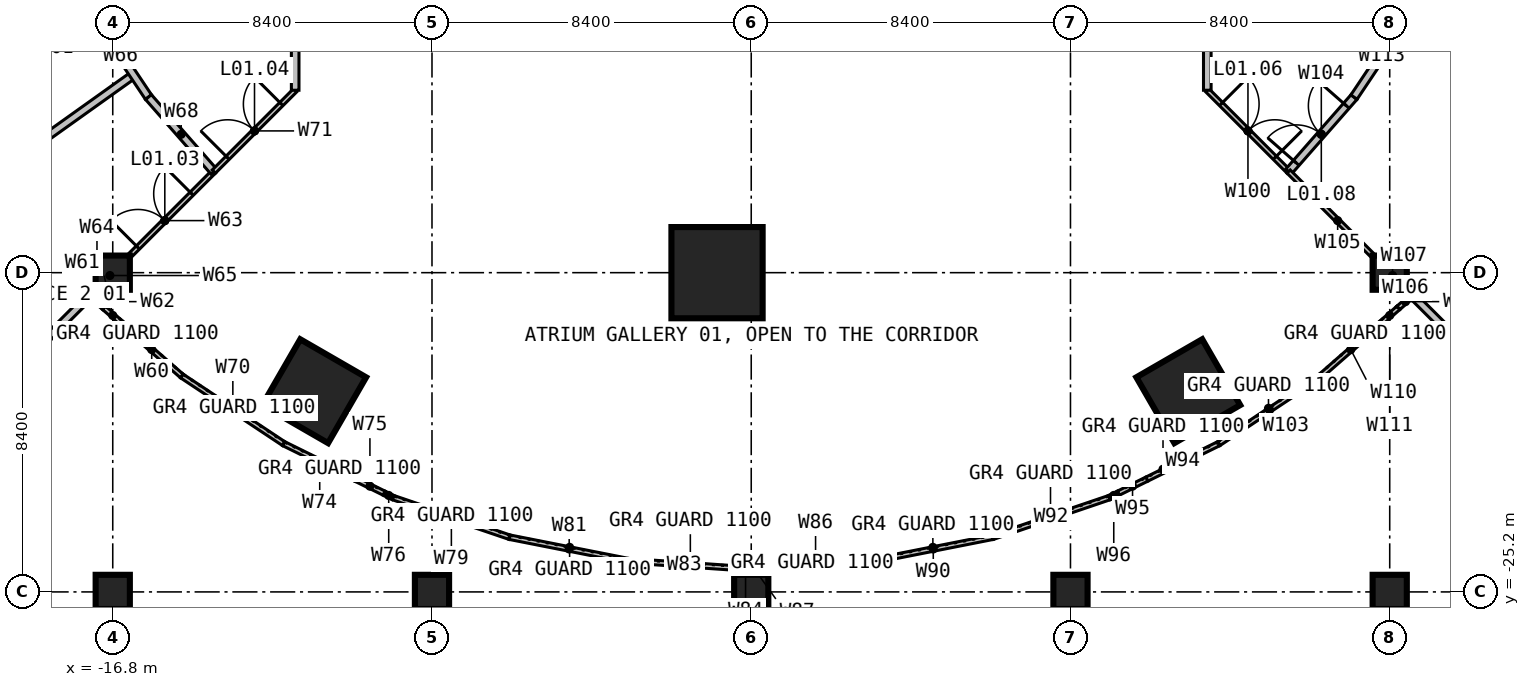
"""IFC4 building model, lengths in metres.
Left out: names, types, materials, properties, quantities, classifications, styles, units other than length and angle.
Written with IfcOpenShell. Run it as: python <this file> out.ifc"""

import sys

from ifc_helpers import new_model, si_unit, direction, frame, frame_2d, origin, origin_2d, place, context, subcontext, project, spatial, rectangle, hollow_rectangle, extrude, element, fill, save


model = new_model("IFC4")
c1 = context("Model", 3, precision=1e-05, world=origin(), true_north=direction((0.0, 1.0)))
c2 = subcontext(c1, "Body", "Model", "MODEL_VIEW")
j1 = project(units=[si_unit("LENGTHUNIT", "METRE"), si_unit("PLANEANGLEUNIT", "RADIAN")], contexts=[c1])
p1 = place(None, origin())
s1 = spatial("IfcSite", under=j1, at=p1, CompositionType="ELEMENT")
p2 = place(p1, origin())
s2 = spatial("IfcBuilding", under=s1, at=p2, CompositionType="ELEMENT")
p3 = place(p2, frame((0.0, 0.0, 6.0)))
s3 = spatial("IfcBuildingStorey", under=s2, at=p3, CompositionType="ELEMENT", Elevation=6.0)
for number, where, z_axis, x_axis in (
    (1, (-16.8, -25.2, 0.0), (0.0, 0.0, 1.0), (1.0, 0.0, 0.0)),
    (2, (-16.8, -16.8, 0.0), (0.0, 0.0, 1.0), (1.0, 0.0, 0.0)),
    (3, (-8.4, -25.2, 0.0), (0.0, 0.0, 1.0), (1.0, 0.0, 0.0)),
    (4, (0.0, -25.2, 0.0), (0.0, 0.0, 1.0), (1.0, 0.0, 0.0)),
):
    element("IfcColumn", number, at=place(p3, frame(where, z_axis=z_axis, x_axis=x_axis)), inside=s3, PredefinedType="COLUMN", context=c2, shape_type="SweptSolid", body=[
        extrude(rectangle(XDim=0.9, YDim=0.9, at=origin_2d()), origin(), (0.0, 0.0, 1.0), 5.0),
    ])
p4 = place(p3, frame((-0.9, -16.8, 0.0), z_axis=(0.0, 0.0, 1.0), x_axis=(1.0, 0.0, 0.0)))
e5 = element("IfcColumn", 5, at=p4, inside=s3, PredefinedType="COLUMN", context=c2, shape_type="SweptSolid", body=[
    extrude(rectangle(XDim=2.4, YDim=2.4, at=origin_2d()), origin(), (0.0, 0.0, 1.0), 5.0),
])
for number, where, z_axis, x_axis in (
    (6, (8.4, -25.2, 0.0), (0.0, 0.0, 1.0), (1.0, 0.0, 0.0)),
    (7, (16.8, -25.2, 0.0), (0.0, 0.0, 1.0), (1.0, 0.0, 0.0)),
    (8, (16.8, -16.8, 0.0), (0.0, 0.0, 1.0), (1.0, 0.0, 0.0)),
):
    element("IfcColumn", number, at=place(p3, frame(where, z_axis=z_axis, x_axis=x_axis)), inside=s3, PredefinedType="COLUMN", context=c2, shape_type="SweptSolid", body=[
        extrude(rectangle(XDim=0.9, YDim=0.9, at=origin_2d()), origin(), (0.0, 0.0, 1.0), 5.0),
    ])
for number, where, z_axis, x_axis in (
    (9, (-11.5, -19.919, 0.0), (0.0, 0.0, 1.0), (-0.5, -0.866, 0.0)),
    (10, (11.5, -19.919, 0.0), (0.0, 0.0, 1.0), (0.5, -0.866, 0.0)),
):
    element("IfcColumn", number, at=place(p3, frame(where, z_axis=z_axis, x_axis=x_axis)), inside=s3, PredefinedType="COLUMN", context=c2, shape_type="SweptSolid", body=[
        extrude(hollow_rectangle(XDim=2.0, YDim=2.0, WallThickness=0.24, at=origin_2d()), origin(), (0.0, 0.0, 1.0), 5.0),
    ])
p5 = place(p3, frame((-28.94, -20.64, 0.0), z_axis=(0.0, 0.0, 1.0), x_axis=(0.814258557322, 0.580502370217, 0.0)))
e11 = element("IfcWall", 11, at=p5, inside=s3, PredefinedType="PARTITIONING", context=c2, shape_type="SweptSolid", body=[
    extrude(rectangle(XDim=15.572, YDim=0.2, at=frame_2d((7.786, 0.0))), origin(), (0.0, 0.0, 1.0), 4.7),
])
p6 = place(p3, frame((-24.486, -24.486, 0.0), z_axis=(0.0, 0.0, 1.0), x_axis=(0.707106781187, 0.707106781187, 0.0)))
e12 = element("IfcWall", 12, at=p6, inside=s3, PredefinedType="PARTITIONING", context=c2, shape_type="SweptSolid", body=[
    extrude(rectangle(XDim=10.022, YDim=0.2, at=frame_2d((5.011, 0.0))), origin(), (0.0, 0.0, 1.0), 4.7),
])
p7 = place(p3, frame((-16.57, -18.127, 0.0), z_axis=(0.0, 0.0, 1.0), x_axis=(0.752226011438, -0.658905173538, 0.0)))
e13 = element("IfcWall", 13, at=p7, inside=s3, PredefinedType="PARTITIONING", context=c2, shape_type="SweptSolid", body=[
    extrude(rectangle(XDim=2.114, YDim=0.12, at=frame_2d((1.057, 0.0))), origin(), (0.0, 0.0, 1.0), 4.7),
])
p8 = place(p3, frame((-17.03, -17.724, 0.0), z_axis=(0.0, 0.0, 1.0), x_axis=(0.752081905539, -0.65906965289, 0.0)))
e14 = element("IfcWall", 14, at=p8, inside=s3, PredefinedType="PARTITIONING", context=c2, shape_type="SweptSolid", body=[
    extrude(rectangle(XDim=0.612, YDim=0.12, at=frame_2d((0.306, 0.0))), origin(), (0.0, 0.0, 1.0), 4.3),
])
p9 = place(p3, frame((-17.4, -17.4, 0.0), z_axis=(0.0, 0.0, 1.0), x_axis=(0.751992181934, -0.659172024824, 0.0)))
e15 = element("IfcWall", 15, at=p9, inside=s3, PredefinedType="PARTITIONING", context=c2, shape_type="SweptSolid", body=[
    extrude(rectangle(XDim=0.492, YDim=0.12, at=frame_2d((0.246, 0.0))), origin(), (0.0, 0.0, 1.0), 4.7),
])
p10 = place(p3, frame((-16.72, -16.72, 0.0), z_axis=(0.0, 0.0, 1.0), x_axis=(0.707106781187, 0.707106781187, 0.0)))
e16 = element("IfcWall", 16, at=p10, inside=s3, PredefinedType="PARTITIONING", context=c2, shape_type="SweptSolid", body=[
    extrude(rectangle(XDim=3.649, YDim=0.12, at=frame_2d((1.824, 0.0))), origin(), (0.0, 0.0, 1.0), 4.7),
])
p11 = place(p10, frame((0.824, 0.0, 0.0)))
e17 = element("IfcOpeningElement", 17, at=p11, cuts=e16, PredefinedType="OPENING", context=c2, shape_type="SweptSolid", body=[
    extrude(rectangle(XDim=2.0, YDim=2.4, at=frame_2d((1.0, 1.2))), frame((0.0, 0.07, 0.0), z_axis=(0.0, -1.0, 0.0), x_axis=(1.0, 0.0, 0.0)), (0.0, 0.0, 1.0), 0.14),
])
p12 = place(p3, frame((-17.4, -17.4, 0.0), z_axis=(0.0, 0.0, 1.0), x_axis=(0.707106781187, 0.707106781187, 0.0)))
e18 = element("IfcWall", 18, at=p12, inside=s3, PredefinedType="PARTITIONING", context=c2, shape_type="SweptSolid", body=[
    extrude(rectangle(XDim=0.523, YDim=0.12, at=frame_2d((0.262, 0.0))), origin(), (0.0, 0.0, 1.0), 4.7),
])
p13 = place(p3, frame((-17.03, -17.03, 0.0), z_axis=(0.0, 0.0, 1.0), x_axis=(0.707106781187, 0.707106781187, 0.0)))
e19 = element("IfcWall", 19, at=p13, inside=s3, PredefinedType="PARTITIONING", context=c2, shape_type="SweptSolid", body=[
    extrude(rectangle(XDim=0.438, YDim=0.12, at=frame_2d((0.219, 0.0))), origin(), (0.0, 0.0, 1.0), 4.3),
])
p14 = place(p3, frame((-17.32, -10.0, 0.0), z_axis=(0.0, 0.0, 1.0), x_axis=(0.556459812229, -0.83087452565, 0.0)))
e20 = element("IfcWall", 20, at=p14, inside=s3, PredefinedType="PARTITIONING", context=c2, shape_type="SweptSolid", body=[
    extrude(rectangle(XDim=2.624, YDim=0.2, at=frame_2d((1.312, 0.0))), origin(), (0.0, 0.0, 1.0), 4.7),
])
p15 = place(p3, frame((-15.86, -12.18, 0.0), z_axis=(0.0, 0.0, 1.0), x_axis=(0.659643857667, -0.751578326618, 0.0)))
e21 = element("IfcWall", 21, at=p15, inside=s3, PredefinedType="PARTITIONING", context=c2, shape_type="SweptSolid", body=[
    extrude(rectangle(XDim=2.608, YDim=0.2, at=frame_2d((1.304, 0.0))), origin(), (0.0, 0.0, 1.0), 4.7),
])
p16 = place(p3, frame((-14.98, -19.52, 0.0), z_axis=(0.0, 0.0, 1.0), x_axis=(0.832994734858, -0.553280915719, 0.0)))
e22 = element("IfcWall", 22, at=p16, inside=s3, PredefinedType="PARTITIONING", context=c2, shape_type="SweptSolid", body=[
    extrude(rectangle(XDim=3.217, YDim=0.12, at=frame_2d((1.609, 0.0))), origin(), (0.0, 0.0, 1.0), 4.7),
])
p17 = place(p3, frame((-14.14, -14.14, 0.0), z_axis=(0.0, 0.0, 1.0), x_axis=(0.707106781187, 0.707106781187, 0.0)))
e23 = element("IfcWall", 23, at=p17, inside=s3, PredefinedType="PARTITIONING", context=c2, shape_type="SweptSolid", body=[
    extrude(rectangle(XDim=3.026, YDim=0.12, at=frame_2d((1.513, 0.0))), origin(), (0.0, 0.0, 1.0), 4.7),
])
p18 = place(p17, frame((0.513, 0.0, 0.0)))
e24 = element("IfcOpeningElement", 24, at=p18, cuts=e23, PredefinedType="OPENING", context=c2, shape_type="SweptSolid", body=[
    extrude(rectangle(XDim=2.0, YDim=2.4, at=frame_2d((1.0, 1.2))), frame((0.0, 0.07, 0.0), z_axis=(0.0, -1.0, 0.0), x_axis=(1.0, 0.0, 0.0)), (0.0, 0.0, 1.0), 0.14),
])
p19 = place(p3, frame((-12.3, -21.3, 0.0), z_axis=(0.0, 0.0, 1.0), x_axis=(0.896913641042, -0.442205744551, 0.0)))
e25 = element("IfcWall", 25, at=p19, inside=s3, PredefinedType="PARTITIONING", context=c2, shape_type="SweptSolid", body=[
    extrude(rectangle(XDim=2.109, YDim=0.12, at=frame_2d((1.055, 0.0))), origin(), (0.0, 0.0, 1.0), 4.7),
])
p20 = place(p3, frame((-10.408, -22.233, 0.0), z_axis=(0.0, 0.0, 1.0), x_axis=(0.896921584296, -0.442189633103, 0.0)))
e26 = element("IfcWall", 26, at=p20, inside=s3, PredefinedType="PARTITIONING", context=c2, shape_type="SweptSolid", body=[
    extrude(rectangle(XDim=0.837, YDim=0.12, at=frame_2d((0.418, 0.0))), origin(), (0.0, 0.0, 1.0), 4.3),
])
p21 = place(p3, frame((-9.658, -22.603, 0.0), z_axis=(0.0, 0.0, 1.0), x_axis=(0.896990941369, -0.442048923878, 0.0)))
e27 = element("IfcWall", 27, at=p21, inside=s3, PredefinedType="PARTITIONING", context=c2, shape_type="SweptSolid", body=[
    extrude(rectangle(XDim=0.265, YDim=0.12, at=frame_2d((0.133, 0.0))), origin(), (0.0, 0.0, 1.0), 4.7),
])
p22 = place(p3, frame((-9.42, -22.72, 0.0), z_axis=(0.0, 0.0, 1.0), x_axis=(0.946800830057, -0.321820117773, 0.0)))
e28 = element("IfcWall", 28, at=p22, inside=s3, PredefinedType="PARTITIONING", context=c2, shape_type="SweptSolid", body=[
    extrude(rectangle(XDim=3.232, YDim=0.12, at=frame_2d((1.616, 0.0))), origin(), (0.0, 0.0, 1.0), 4.7),
])
p23 = place(p3, frame((-6.36, -23.76, 0.0), z_axis=(0.0, 0.0, 1.0), x_axis=(0.98106754531, -0.193665876033, 0.0)))
e29 = element("IfcWall", 29, at=p23, inside=s3, PredefinedType="PARTITIONING", context=c2, shape_type="SweptSolid", body=[
    extrude(rectangle(XDim=3.201, YDim=0.12, at=frame_2d((1.6, 0.0))), origin(), (0.0, 0.0, 1.0), 4.7),
])
p24 = place(p3, frame((-3.22, -24.38, 0.0), z_axis=(0.0, 0.0, 1.0), x_axis=(0.997672751552, -0.068184168332, 0.0)))
e30 = element("IfcWall", 30, at=p24, inside=s3, PredefinedType="PARTITIONING", context=c2, shape_type="SweptSolid", body=[
    extrude(rectangle(XDim=2.929, YDim=0.12, at=frame_2d((1.464, 0.0))), origin(), (0.0, 0.0, 1.0), 4.7),
])
p25 = place(p3, frame((-0.298, -24.58, 0.0), z_axis=(0.0, 0.0, 1.0), x_axis=(0.997638063988, -0.068689833914, 0.0)))
e31 = element("IfcWall", 31, at=p25, inside=s3, PredefinedType="PARTITIONING", context=c2, shape_type="SweptSolid", body=[
    extrude(rectangle(XDim=0.299, YDim=0.12, at=frame_2d((0.149, 0.0))), origin(), (0.0, 0.0, 1.0), 4.3),
])
p26 = place(p3, frame((0.166, -24.589, 0.0), z_axis=(0.0, 0.0, 1.0), x_axis=(0.997672608774, 0.068186257434, 0.0)))
e32 = element("IfcWall", 32, at=p26, inside=s3, PredefinedType="PARTITIONING", context=c2, shape_type="SweptSolid", body=[
    extrude(rectangle(XDim=3.061, YDim=0.12, at=frame_2d((1.531, 0.0))), origin(), (0.0, 0.0, 1.0), 4.7),
])
p27 = place(p3, frame((0.0, -24.6, 0.0), z_axis=(0.0, 0.0, 1.0), x_axis=(0.997612909128, 0.069054207259, 0.0)))
e33 = element("IfcWall", 33, at=p27, inside=s3, PredefinedType="PARTITIONING", context=c2, shape_type="SweptSolid", body=[
    extrude(rectangle(XDim=0.166, YDim=0.12, at=frame_2d((0.083, 0.0))), origin(), (0.0, 0.0, 1.0), 4.3),
])
p28 = place(p3, frame((3.22, -24.38, 0.0), z_axis=(0.0, 0.0, 1.0), x_axis=(0.98106754531, 0.193665876033, 0.0)))
e34 = element("IfcWall", 34, at=p28, inside=s3, PredefinedType="PARTITIONING", context=c2, shape_type="SweptSolid", body=[
    extrude(rectangle(XDim=3.201, YDim=0.12, at=frame_2d((1.6, 0.0))), origin(), (0.0, 0.0, 1.0), 4.7),
])
p29 = place(p3, frame((6.36, -23.76, 0.0), z_axis=(0.0, 0.0, 1.0), x_axis=(0.946800830057, 0.321820117773, 0.0)))
e35 = element("IfcWall", 35, at=p29, inside=s3, PredefinedType="PARTITIONING", context=c2, shape_type="SweptSolid", body=[
    extrude(rectangle(XDim=3.232, YDim=0.12, at=frame_2d((1.616, 0.0))), origin(), (0.0, 0.0, 1.0), 4.7),
])
p30 = place(p3, frame((10.408, -22.233, 0.0), z_axis=(0.0, 0.0, 1.0), x_axis=(0.896913641042, 0.442205744551, 0.0)))
e36 = element("IfcWall", 36, at=p30, inside=s3, PredefinedType="PARTITIONING", context=c2, shape_type="SweptSolid", body=[
    extrude(rectangle(XDim=2.109, YDim=0.12, at=frame_2d((1.055, 0.0))), origin(), (0.0, 0.0, 1.0), 4.7),
])
p31 = place(p3, frame((9.658, -22.603, 0.0), z_axis=(0.0, 0.0, 1.0), x_axis=(0.896921584296, 0.442189633103, 0.0)))
e37 = element("IfcWall", 37, at=p31, inside=s3, PredefinedType="PARTITIONING", context=c2, shape_type="SweptSolid", body=[
    extrude(rectangle(XDim=0.837, YDim=0.12, at=frame_2d((0.418, 0.0))), origin(), (0.0, 0.0, 1.0), 4.3),
])
p32 = place(p3, frame((9.42, -22.72, 0.0), z_axis=(0.0, 0.0, 1.0), x_axis=(0.896990941369, 0.442048923878, 0.0)))
e38 = element("IfcWall", 38, at=p32, inside=s3, PredefinedType="PARTITIONING", context=c2, shape_type="SweptSolid", body=[
    extrude(rectangle(XDim=0.265, YDim=0.12, at=frame_2d((0.133, 0.0))), origin(), (0.0, 0.0, 1.0), 4.7),
])
p33 = place(p3, frame((12.0, -12.0, 0.0), z_axis=(0.0, 0.0, 1.0), x_axis=(0.707106781187, -0.707106781187, 0.0)))
e39 = element("IfcWall", 39, at=p33, inside=s3, PredefinedType="PARTITIONING", context=c2, shape_type="SweptSolid", body=[
    extrude(rectangle(XDim=3.026, YDim=0.12, at=frame_2d((1.513, 0.0))), origin(), (0.0, 0.0, 1.0), 4.7),
])
p34 = place(p33, frame((0.513, 0.0, 0.0)))
e40 = element("IfcOpeningElement", 40, at=p34, cuts=e39, PredefinedType="OPENING", context=c2, shape_type="SweptSolid", body=[
    extrude(rectangle(XDim=2.0, YDim=2.4, at=frame_2d((1.0, 1.2))), frame((0.0, 0.07, 0.0), z_axis=(0.0, -1.0, 0.0), x_axis=(1.0, 0.0, 0.0)), (0.0, 0.0, 1.0), 0.14),
])
p35 = place(p3, frame((12.3, -21.3, 0.0), z_axis=(0.0, 0.0, 1.0), x_axis=(0.832994734858, 0.553280915719, 0.0)))
e41 = element("IfcWall", 41, at=p35, inside=s3, PredefinedType="PARTITIONING", context=c2, shape_type="SweptSolid", body=[
    extrude(rectangle(XDim=3.217, YDim=0.12, at=frame_2d((1.609, 0.0))), origin(), (0.0, 0.0, 1.0), 4.7),
])
p36 = place(p3, frame((14.14, -14.14, 0.0), z_axis=(0.0, 0.0, 1.0), x_axis=(0.659643857667, 0.751578326618, 0.0)))
e42 = element("IfcWall", 42, at=p36, inside=s3, PredefinedType="PARTITIONING", context=c2, shape_type="SweptSolid", body=[
    extrude(rectangle(XDim=2.608, YDim=0.2, at=frame_2d((1.304, 0.0))), origin(), (0.0, 0.0, 1.0), 4.7),
])
p37 = place(p36, frame((0.304, 0.0, 0.0)))
e43 = element("IfcOpeningElement", 43, at=p37, cuts=e42, PredefinedType="OPENING", context=c2, shape_type="SweptSolid", body=[
    extrude(rectangle(XDim=2.0, YDim=2.4, at=frame_2d((1.0, 1.2))), frame((0.0, 0.11, 0.0), z_axis=(0.0, -1.0, 0.0), x_axis=(1.0, 0.0, 0.0)), (0.0, 0.0, 1.0), 0.22),
])
p38 = place(p3, frame((14.14, -14.14, 0.0), z_axis=(0.0, 0.0, 1.0), x_axis=(0.707106781187, -0.707106781187, 0.0)))
e44 = element("IfcWall", 44, at=p38, inside=s3, PredefinedType="PARTITIONING", context=c2, shape_type="SweptSolid", body=[
    extrude(rectangle(XDim=3.649, YDim=0.12, at=frame_2d((1.824, 0.0))), origin(), (0.0, 0.0, 1.0), 4.7),
])
p39 = place(p3, frame((17.03, -17.03, 0.0), z_axis=(0.0, 0.0, 1.0), x_axis=(0.707106781187, -0.707106781187, 0.0)))
e45 = element("IfcWall", 45, at=p39, inside=s3, PredefinedType="PARTITIONING", context=c2, shape_type="SweptSolid", body=[
    extrude(rectangle(XDim=0.523, YDim=0.12, at=frame_2d((0.262, 0.0))), origin(), (0.0, 0.0, 1.0), 4.7),
])
p40 = place(p3, frame((16.72, -16.72, 0.0), z_axis=(0.0, 0.0, 1.0), x_axis=(0.707106781187, -0.707106781187, 0.0)))
e46 = element("IfcWall", 46, at=p40, inside=s3, PredefinedType="PARTITIONING", context=c2, shape_type="SweptSolid", body=[
    extrude(rectangle(XDim=0.438, YDim=0.12, at=frame_2d((0.219, 0.0))), origin(), (0.0, 0.0, 1.0), 4.3),
])
p41 = place(p3, frame((14.98, -19.52, 0.0), z_axis=(0.0, 0.0, 1.0), x_axis=(0.752226011438, 0.658905173538, 0.0)))
e47 = element("IfcWall", 47, at=p41, inside=s3, PredefinedType="PARTITIONING", context=c2, shape_type="SweptSolid", body=[
    extrude(rectangle(XDim=2.114, YDim=0.12, at=frame_2d((1.057, 0.0))), origin(), (0.0, 0.0, 1.0), 4.7),
])
p42 = place(p3, frame((16.57, -18.127, 0.0), z_axis=(0.0, 0.0, 1.0), x_axis=(0.752081905539, 0.65906965289, 0.0)))
e48 = element("IfcWall", 48, at=p42, inside=s3, PredefinedType="PARTITIONING", context=c2, shape_type="SweptSolid", body=[
    extrude(rectangle(XDim=0.612, YDim=0.12, at=frame_2d((0.306, 0.0))), origin(), (0.0, 0.0, 1.0), 4.3),
])
p43 = place(p3, frame((17.03, -17.724, 0.0), z_axis=(0.0, 0.0, 1.0), x_axis=(0.751992181934, 0.659172024824, 0.0)))
e49 = element("IfcWall", 49, at=p43, inside=s3, PredefinedType="PARTITIONING", context=c2, shape_type="SweptSolid", body=[
    extrude(rectangle(XDim=0.492, YDim=0.12, at=frame_2d((0.246, 0.0))), origin(), (0.0, 0.0, 1.0), 4.7),
])
p44 = place(p3, frame((15.86, -12.18, 0.0), z_axis=(0.0, 0.0, 1.0), x_axis=(0.556459812229, 0.83087452565, 0.0)))
e50 = element("IfcWall", 50, at=p44, inside=s3, PredefinedType="PARTITIONING", context=c2, shape_type="SweptSolid", body=[
    extrude(rectangle(XDim=2.624, YDim=0.2, at=frame_2d((1.312, 0.0))), origin(), (0.0, 0.0, 1.0), 4.7),
])
p45 = place(p3, frame((17.4, -17.4, 0.0), z_axis=(0.0, 0.0, 1.0), x_axis=(0.707106781187, -0.707106781187, 0.0)))
e51 = element("IfcWall", 51, at=p45, inside=s3, PredefinedType="PARTITIONING", context=c2, shape_type="SweptSolid", body=[
    extrude(rectangle(XDim=10.022, YDim=0.2, at=frame_2d((5.011, 0.0))), origin(), (0.0, 0.0, 1.0), 4.7),
])
for number, where, z_axis, x_axis in (
    (52, (12.0, -12.0, 0.0), (0.0, 0.0, 1.0), (0.0, 1.0, 0.0)),
    (53, (-12.0, 12.0, 0.0), (0.0, 0.0, 1.0), (0.0, -1.0, 0.0)),
):
    element("IfcWall", number, at=place(p3, frame(where, z_axis=z_axis, x_axis=x_axis)), inside=s3, PredefinedType="PARTITIONING", context=c2, shape_type="SweptSolid", body=[
        extrude(rectangle(XDim=24.0, YDim=0.2, at=frame_2d((12.0, 0.0))), origin(), (0.0, 0.0, 1.0), 4.7),
    ])
p46 = place(p11, origin())
e54 = element("IfcDoor", 54, at=p46, inside=s3, OperationType="DOUBLE_DOOR_SINGLE_SWING", PredefinedType="DOOR", context=c2, shape_type="SweptSolid", body=[
    extrude(rectangle(XDim=2.0, YDim=2.4, at=frame_2d((1.0, 1.2))), frame((0.0, 0.025, 0.0), z_axis=(0.0, -1.0, 0.0), x_axis=(1.0, 0.0, 0.0)), (0.0, 0.0, 1.0), 0.05),
])
fill(e17, e54)
p47 = place(p18, origin())
e55 = element("IfcDoor", 55, at=p47, inside=s3, OperationType="DOUBLE_DOOR_SINGLE_SWING", PredefinedType="DOOR", context=c2, shape_type="SweptSolid", body=[
    extrude(rectangle(XDim=2.0, YDim=2.4, at=frame_2d((1.0, 1.2))), frame((0.0, 0.025, 0.0), z_axis=(0.0, -1.0, 0.0), x_axis=(1.0, 0.0, 0.0)), (0.0, 0.0, 1.0), 0.05),
])
fill(e24, e55)
p48 = place(p34, origin())
e56 = element("IfcDoor", 56, at=p48, inside=s3, OperationType="DOUBLE_DOOR_SINGLE_SWING", PredefinedType="DOOR", context=c2, shape_type="SweptSolid", body=[
    extrude(rectangle(XDim=2.0, YDim=2.4, at=frame_2d((1.0, 1.2))), frame((0.0, 0.025, 0.0), z_axis=(0.0, -1.0, 0.0), x_axis=(1.0, 0.0, 0.0)), (0.0, 0.0, 1.0), 0.05),
])
fill(e40, e56)
p49 = place(p37, origin())
e57 = element("IfcDoor", 57, at=p49, inside=s3, OperationType="DOUBLE_DOOR_SINGLE_SWING", PredefinedType="DOOR", context=c2, shape_type="SweptSolid", body=[
    extrude(rectangle(XDim=2.0, YDim=2.4, at=frame_2d((1.0, 1.2))), frame((0.0, 0.025, 0.0), z_axis=(0.0, -1.0, 0.0), x_axis=(1.0, 0.0, 0.0)), (0.0, 0.0, 1.0), 0.05),
])
fill(e43, e57)
save(model, sys.argv[1])
